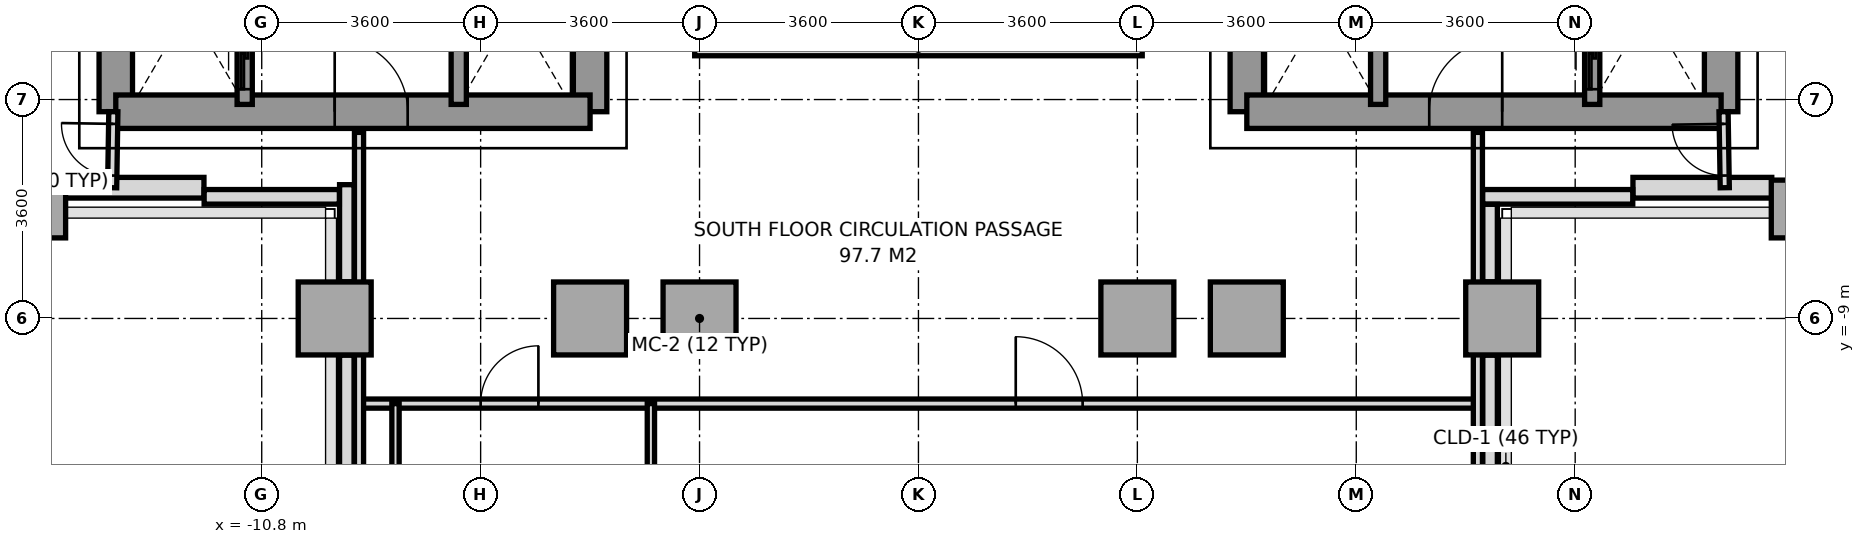
"""IFC4 building model, lengths in metres.
Left out: names, types, materials, properties, quantities, classifications, styles, units other than length and angle.
Written with IfcOpenShell. Run it as: python <this file> out.ifc"""

import sys

from ifc_helpers import new_model, si_unit, direction, frame, frame_2d, origin, origin_2d, place, context, subcontext, project, spatial, rectangle, extrude, source, transform, mapped, element, fill, save


model = new_model("IFC4")
c1 = context("Model", 3, precision=1e-05, world=origin(), true_north=direction((0.0, 1.0)))
c2 = subcontext(c1, "Body", "Model", "MODEL_VIEW")
j1 = project(units=[si_unit("LENGTHUNIT", "METRE"), si_unit("PLANEANGLEUNIT", "RADIAN")], contexts=[c1])
p1 = place(None, origin())
s1 = spatial("IfcSite", under=j1, at=p1, CompositionType="ELEMENT")
p2 = place(p1, origin())
s2 = spatial("IfcBuilding", under=s1, at=p2, CompositionType="ELEMENT")
p3 = place(p2, frame((0.0, 0.0, 44.2)))
s3 = spatial("IfcBuildingStorey", under=s2, at=p3, CompositionType="ELEMENT", Elevation=44.2)
m1 = source(origin(), c2, "Body", "SweptSolid", [
    extrude(rectangle(XDim=0.75, YDim=0.95, at=origin_2d()), origin(), (0.0, 0.0, 1.0), 3.2),
])
p4 = place(p3, frame((-14.4, -7.2, 0.0), z_axis=(0.0, 0.0, 1.0), x_axis=(1.0, 0.0, 0.0)))
e1 = element("IfcColumn", 1, at=p4, inside=s3, PredefinedType="COLUMN", context=c2, shape_type="MappedRepresentation", body=[
    mapped(m1, transform((0.0, 0.0, 0.0), x_axis=(1.0, 0.0, 0.0), y_axis=(0.0, 1.0, 0.0), z_axis=(0.0, 0.0, 1.0), scale=1.0)),
])
m2 = source(origin(), c2, "Body", "SweptSolid", [
    extrude(rectangle(XDim=1.2, YDim=1.2, at=origin_2d()), origin(), (0.0, 0.0, 1.0), 3.2),
])
for number, where, z_axis, x_axis in (
    (2, (-9.6, -9.0, 0.0), (0.0, 0.0, 1.0), (1.0, 0.0, 0.0)),
    (3, (-5.4, -9.0, 0.0), (0.0, 0.0, 1.0), (1.0, 0.0, 0.0)),
    (4, (-3.6, -9.0, 0.0), (0.0, 0.0, 1.0), (1.0, 0.0, 0.0)),
    (5, (3.6, -9.0, 0.0), (0.0, 0.0, 1.0), (1.0, 0.0, 0.0)),
    (6, (5.4, -9.0, 0.0), (0.0, 0.0, 1.0), (1.0, 0.0, 0.0)),
    (7, (9.6, -9.0, 0.0), (0.0, 0.0, 1.0), (1.0, 0.0, 0.0)),
):
    element("IfcColumn", number, at=place(p3, frame(where, z_axis=z_axis, x_axis=x_axis)), inside=s3, PredefinedType="COLUMN", context=c2, shape_type="MappedRepresentation", body=[
        mapped(m2, transform((0.0, 0.0, 0.0), x_axis=(1.0, 0.0, 0.0), y_axis=(0.0, 1.0, 0.0), z_axis=(0.0, 0.0, 1.0), scale=1.0)),
    ])
p5 = place(p3, frame((14.4, -7.2, 0.0), z_axis=(0.0, 0.0, 1.0), x_axis=(1.0, 0.0, 0.0)))
e8 = element("IfcColumn", 8, at=p5, inside=s3, PredefinedType="COLUMN", context=c2, shape_type="MappedRepresentation", body=[
    mapped(m1, transform((0.0, 0.0, 0.0), x_axis=(1.0, 0.0, 0.0), y_axis=(0.0, 1.0, 0.0), z_axis=(0.0, 0.0, 1.0), scale=1.0)),
])
for number, where, z_axis, x_axis in (
    (9, (-14.033, -6.85, 0.0), (0.0, 0.0, 1.0), (1.0, 0.0, 0.0)),
    (10, (11.75, -6.85, 0.0), (0.0, 0.0, 1.0), (1.0, 0.0, 0.0)),
):
    element("IfcWall", number, at=place(p3, frame(where, z_axis=z_axis, x_axis=x_axis)), inside=s3, PredefinedType="SOLIDWALL", context=c2, shape_type="SweptSolid", body=[
        extrude(rectangle(XDim=2.283, YDim=0.34, at=frame_2d((1.142, 0.0))), origin(), (0.0, 0.0, 1.0), 3.2),
    ])
p6 = place(p3, frame((11.747, -7.0, 0.0), z_axis=(0.0, 0.0, 1.0), x_axis=(-1.0, 0.0, 0.0)))
e11 = element("IfcWall", 11, at=p6, inside=s3, PredefinedType="PARAPET", context=c2, shape_type="SweptSolid", body=[
    extrude(rectangle(XDim=2.469, YDim=0.24, at=frame_2d((1.234, 0.0))), origin(), (0.0, 0.0, 1.0), 1.15),
])
p7 = place(p3, frame((9.4, -7.123, 0.0), z_axis=(0.0, 0.0, 1.0), x_axis=(0.0, -1.0, 0.0)))
e12 = element("IfcWall", 12, at=p7, inside=s3, PredefinedType="PARAPET", context=c2, shape_type="SweptSolid", body=[
    extrude(rectangle(XDim=1.274, YDim=0.24, at=frame_2d((0.637, 0.0))), origin(), (0.0, 0.0, 1.0), 1.15),
])
p8 = place(p3, frame((9.4, -9.603, 0.0), z_axis=(0.0, 0.0, 1.0), x_axis=(0.0, -1.0, 0.0)))
e13 = element("IfcWall", 13, at=p8, inside=s3, PredefinedType="PARAPET", context=c2, shape_type="SweptSolid", body=[
    extrude(rectangle(XDim=6.0, YDim=0.24, at=frame_2d((3.0, 0.0))), origin(), (0.0, 0.0, 1.0), 1.15),
])
p9 = place(p3, frame((-9.4, -15.358, 0.0), z_axis=(0.0, 0.0, 1.0), x_axis=(0.0, 1.0, 0.0)))
e14 = element("IfcWall", 14, at=p9, inside=s3, PredefinedType="PARAPET", context=c2, shape_type="SweptSolid", body=[
    extrude(rectangle(XDim=5.755, YDim=0.24, at=frame_2d((2.877, 0.0))), origin(), (0.0, 0.0, 1.0), 1.15),
])
p10 = place(p3, frame((-9.4, -8.397, 0.0), z_axis=(0.0, 0.0, 1.0), x_axis=(0.0, 1.0, 0.0)))
e15 = element("IfcWall", 15, at=p10, inside=s3, PredefinedType="PARAPET", context=c2, shape_type="SweptSolid", body=[
    extrude(rectangle(XDim=1.597, YDim=0.24, at=frame_2d((0.798, 0.0))), origin(), (0.0, 0.0, 1.0), 1.15),
])
p11 = place(p3, frame((-9.523, -7.0, 0.0), z_axis=(0.0, 0.0, 1.0), x_axis=(-1.0, 0.0, 0.0)))
e16 = element("IfcWall", 16, at=p11, inside=s3, PredefinedType="PARAPET", context=c2, shape_type="SweptSolid", body=[
    extrude(rectangle(XDim=2.224, YDim=0.24, at=frame_2d((1.112, 0.0))), origin(), (0.0, 0.0, 1.0), 1.15),
])
p12 = place(p3, frame((-13.2, -5.6, 0.0), z_axis=(0.0, 0.0, 1.0), x_axis=(0.0, 1.0, 0.0)))
e17 = element("IfcWall", 17, at=p12, inside=s3, PredefinedType="SHEAR", context=c2, shape_type="SweptSolid", body=[
    extrude(rectangle(XDim=11.2, YDim=0.55, at=frame_2d((5.6, 0.0))), origin(), (0.0, 0.0, 1.0), 3.2),
])
p13 = place(p3, frame((-5.4, -5.6, 0.0), z_axis=(0.0, 0.0, 1.0), x_axis=(0.0, 1.0, 0.0)))
e18 = element("IfcWall", 18, at=p13, inside=s3, PredefinedType="SHEAR", context=c2, shape_type="SweptSolid", body=[
    extrude(rectangle(XDim=12.5, YDim=0.55, at=frame_2d((6.25, 0.0))), origin(), (0.0, 0.0, 1.0), 3.2),
])
p14 = place(p13, frame((4.55, 0.0, 0.0)))
e19 = element("IfcOpeningElement", 19, at=p14, cuts=e18, PredefinedType="OPENING", context=c2, shape_type="SweptSolid", body=[
    extrude(rectangle(XDim=1.2, YDim=2.2, at=frame_2d((0.6, 1.1))), frame((0.0, 0.285, 0.0), z_axis=(0.0, -1.0, 0.0), x_axis=(1.0, 0.0, 0.0)), (0.0, 0.0, 1.0), 0.57),
])
p15 = place(p13, frame((6.86, 0.0, 0.0)))
e20 = element("IfcOpeningElement", 20, at=p15, cuts=e18, PredefinedType="OPENING", context=c2, shape_type="SweptSolid", body=[
    extrude(rectangle(XDim=0.8, YDim=2.1, at=frame_2d((0.4, 1.05))), frame((0.0, 0.285, 0.0), z_axis=(0.0, -1.0, 0.0), x_axis=(1.0, 0.0, 0.0)), (0.0, 0.0, 1.0), 0.57),
])
p16 = place(p13, frame((7.88, 0.0, 0.0)))
e21 = element("IfcOpeningElement", 21, at=p16, cuts=e18, PredefinedType="OPENING", context=c2, shape_type="SweptSolid", body=[
    extrude(rectangle(XDim=0.8, YDim=2.1, at=frame_2d((0.4, 1.05))), frame((0.0, 0.285, 0.0), z_axis=(0.0, -1.0, 0.0), x_axis=(1.0, 0.0, 0.0)), (0.0, 0.0, 1.0), 0.57),
])
p17 = place(p3, frame((-13.2, -5.6, 0.0), z_axis=(0.0, 0.0, 1.0), x_axis=(1.0, 0.0, 0.0)))
e22 = element("IfcWall", 22, at=p17, inside=s3, PredefinedType="SHEAR", context=c2, shape_type="SweptSolid", body=[
    extrude(rectangle(XDim=7.8, YDim=0.55, at=frame_2d((3.9, 0.0))), origin(), (0.0, 0.0, 1.0), 3.2),
])
p18 = place(p17, frame((3.6, 0.0, 0.0)))
e23 = element("IfcOpeningElement", 23, at=p18, cuts=e22, PredefinedType="OPENING", context=c2, shape_type="SweptSolid", body=[
    extrude(rectangle(XDim=1.2, YDim=2.2, at=frame_2d((0.6, 1.1))), frame((0.0, 0.285, 0.0), z_axis=(0.0, -1.0, 0.0), x_axis=(1.0, 0.0, 0.0)), (0.0, 0.0, 1.0), 0.57),
])
p19 = place(p3, frame((13.2, -5.6, 0.0), z_axis=(0.0, 0.0, 1.0), x_axis=(0.0, 1.0, 0.0)))
e24 = element("IfcWall", 24, at=p19, inside=s3, PredefinedType="SHEAR", context=c2, shape_type="SweptSolid", body=[
    extrude(rectangle(XDim=11.2, YDim=0.55, at=frame_2d((5.6, 0.0))), origin(), (0.0, 0.0, 1.0), 3.2),
])
p20 = place(p3, frame((5.4, -5.6, 0.0), z_axis=(0.0, 0.0, 1.0), x_axis=(0.0, 1.0, 0.0)))
e25 = element("IfcWall", 25, at=p20, inside=s3, PredefinedType="SHEAR", context=c2, shape_type="SweptSolid", body=[
    extrude(rectangle(XDim=12.5, YDim=0.55, at=frame_2d((6.25, 0.0))), origin(), (0.0, 0.0, 1.0), 3.2),
])
p21 = place(p20, frame((4.55, 0.0, 0.0)))
e26 = element("IfcOpeningElement", 26, at=p21, cuts=e25, PredefinedType="OPENING", context=c2, shape_type="SweptSolid", body=[
    extrude(rectangle(XDim=1.2, YDim=2.2, at=frame_2d((0.6, 1.1))), frame((0.0, 0.285, 0.0), z_axis=(0.0, -1.0, 0.0), x_axis=(1.0, 0.0, 0.0)), (0.0, 0.0, 1.0), 0.57),
])
p22 = place(p3, frame((5.4, -5.6, 0.0), z_axis=(0.0, 0.0, 1.0), x_axis=(1.0, 0.0, 0.0)))
e27 = element("IfcWall", 27, at=p22, inside=s3, PredefinedType="SHEAR", context=c2, shape_type="SweptSolid", body=[
    extrude(rectangle(XDim=7.8, YDim=0.55, at=frame_2d((3.9, 0.0))), origin(), (0.0, 0.0, 1.0), 3.2),
])
p23 = place(p22, frame((3.0, 0.0, 0.0)))
e28 = element("IfcOpeningElement", 28, at=p23, cuts=e27, PredefinedType="OPENING", context=c2, shape_type="SweptSolid", body=[
    extrude(rectangle(XDim=1.2, YDim=2.2, at=frame_2d((0.6, 1.1))), frame((0.0, 0.285, 0.0), z_axis=(0.0, -1.0, 0.0), x_axis=(1.0, 0.0, 0.0)), (0.0, 0.0, 1.0), 0.57),
])
p24 = place(p3, frame((-11.08, -5.48, 0.0), z_axis=(0.0, 0.0, 1.0), x_axis=(0.0, 1.0, 0.0)))
e29 = element("IfcWall", 29, at=p24, inside=s3, PredefinedType="SOLIDWALL", context=c2, shape_type="SweptSolid", body=[
    extrude(rectangle(XDim=1.6, YDim=0.25, at=frame_2d((0.8, 0.0))), origin(), (0.0, 0.0, 1.0), 3.2),
])
p25 = place(p24, frame((0.25, 0.0, 0.0)))
e30 = element("IfcOpeningElement", 30, at=p25, cuts=e29, PredefinedType="OPENING", context=c2, shape_type="SweptSolid", body=[
    extrude(rectangle(XDim=1.1, YDim=2.2, at=frame_2d((0.55, 1.1))), frame((0.0, 0.135, 0.0), z_axis=(0.0, -1.0, 0.0), x_axis=(1.0, 0.0, 0.0)), (0.0, 0.0, 1.0), 0.27),
])
p26 = place(p3, frame((11.08, -5.48, 0.0), z_axis=(0.0, 0.0, 1.0), x_axis=(0.0, 1.0, 0.0)))
e31 = element("IfcWall", 31, at=p26, inside=s3, PredefinedType="SOLIDWALL", context=c2, shape_type="SweptSolid", body=[
    extrude(rectangle(XDim=1.6, YDim=0.25, at=frame_2d((0.8, 0.0))), origin(), (0.0, 0.0, 1.0), 3.2),
])
p27 = place(p26, frame((0.25, 0.0, 0.0)))
e32 = element("IfcOpeningElement", 32, at=p27, cuts=e31, PredefinedType="OPENING", context=c2, shape_type="SweptSolid", body=[
    extrude(rectangle(XDim=1.1, YDim=2.2, at=frame_2d((0.55, 1.1))), frame((0.0, 0.135, 0.0), z_axis=(0.0, -1.0, 0.0), x_axis=(1.0, 0.0, 0.0)), (0.0, 0.0, 1.0), 0.27),
])
for number, where, z_axis, x_axis in (
    (33, (-7.56, -5.48, 0.0), (0.0, 0.0, 1.0), (0.0, 1.0, 0.0)),
    (34, (7.56, -5.48, 0.0), (0.0, 0.0, 1.0), (0.0, 1.0, 0.0)),
):
    element("IfcWall", number, at=place(p3, frame(where, z_axis=z_axis, x_axis=x_axis)), inside=s3, PredefinedType="SOLIDWALL", context=c2, shape_type="SweptSolid", body=[
        extrude(rectangle(XDim=1.6, YDim=0.25, at=frame_2d((0.8, 0.0))), origin(), (0.0, 0.0, 1.0), 3.2),
    ])
p28 = place(p3, frame((-9.2, -10.4, 0.0), z_axis=(0.0, 0.0, 1.0), x_axis=(1.0, 0.0, 0.0)))
e35 = element("IfcWall", 35, at=p28, inside=s3, PredefinedType="PARTITIONING", context=c2, shape_type="SweptSolid", body=[
    extrude(rectangle(XDim=18.4, YDim=0.15, at=frame_2d((9.2, 0.0))), origin(), (0.0, 0.0, 1.0), 3.2),
])
p29 = place(p28, frame((2.0, 0.0, 0.0)))
e36 = element("IfcOpeningElement", 36, at=p29, cuts=e35, PredefinedType="OPENING", context=c2, shape_type="SweptSolid", body=[
    extrude(rectangle(XDim=0.95, YDim=2.15, at=frame_2d((0.475, 1.075))), frame((0.0, 0.085, 0.0), z_axis=(0.0, -1.0, 0.0), x_axis=(1.0, 0.0, 0.0)), (0.0, 0.0, 1.0), 0.17),
])
p30 = place(p28, frame((10.8, 0.0, 0.0)))
e37 = element("IfcOpeningElement", 37, at=p30, cuts=e35, PredefinedType="OPENING", context=c2, shape_type="SweptSolid", body=[
    extrude(rectangle(XDim=1.1, YDim=2.2, at=frame_2d((0.55, 1.1))), frame((0.0, 0.085, 0.0), z_axis=(0.0, -1.0, 0.0), x_axis=(1.0, 0.0, 0.0)), (0.0, 0.0, 1.0), 0.17),
])
for number, where, z_axis, x_axis in (
    (38, (-9.2, -15.68, 0.0), (0.0, 0.0, 1.0), (0.0, 1.0, 0.0)),
    (39, (9.2, -15.68, 0.0), (0.0, 0.0, 1.0), (0.0, 1.0, 0.0)),
):
    element("IfcWall", number, at=place(p3, frame(where, z_axis=z_axis, x_axis=x_axis)), inside=s3, PredefinedType="PARTITIONING", context=c2, shape_type="SweptSolid", body=[
        extrude(rectangle(XDim=9.74, YDim=0.15, at=frame_2d((4.87, 0.0))), origin(), (0.0, 0.0, 1.0), 2.65),
    ])
for number, where, z_axis, x_axis in (
    (40, (-8.6, -14.0, 0.0), (0.0, 0.0, 1.0), (0.0, 1.0, 0.0)),
    (41, (-4.4, -14.0, 0.0), (0.0, 0.0, 1.0), (0.0, 1.0, 0.0)),
):
    element("IfcWall", number, at=place(p3, frame(where, z_axis=z_axis, x_axis=x_axis)), inside=s3, PredefinedType="PARTITIONING", context=c2, shape_type="SweptSolid", body=[
        extrude(rectangle(XDim=3.6, YDim=0.12, at=frame_2d((1.8, 0.0))), origin(), (0.0, 0.0, 1.0), 3.2),
    ])
p31 = place(p3, frame((-13.26, -6.85, 0.0), z_axis=(0.0, 0.0, 1.0), x_axis=(0.016013571389, 0.999871774545, 0.0)))
e42 = element("IfcWall", 42, at=p31, inside=s3, PredefinedType="PARTITIONING", context=c2, shape_type="SweptSolid", body=[
    extrude(rectangle(XDim=1.25, YDim=0.15, at=frame_2d((0.625, 0.0))), origin(), (0.0, 0.0, 1.0), 3.2),
])
p32 = place(p31, frame((0.2, 0.0, 0.0)))
e43 = element("IfcOpeningElement", 43, at=p32, cuts=e42, PredefinedType="OPENING", context=c2, shape_type="SweptSolid", body=[
    extrude(rectangle(XDim=0.85, YDim=2.1, at=frame_2d((0.425, 1.05))), frame((0.0, 0.085, 0.0), z_axis=(0.0, -1.0, 0.0), x_axis=(1.0, 0.0, 0.0)), (0.0, 0.0, 1.0), 0.17),
])
p33 = place(p3, frame((13.26, -6.85, 0.0), z_axis=(0.0, 0.0, 1.0), x_axis=(-0.016013571389, 0.999871774545, 0.0)))
e44 = element("IfcWall", 44, at=p33, inside=s3, PredefinedType="PARTITIONING", context=c2, shape_type="SweptSolid", body=[
    extrude(rectangle(XDim=1.25, YDim=0.15, at=frame_2d((0.625, 0.0))), origin(), (0.0, 0.0, 1.0), 3.2),
])
p34 = place(p33, frame((0.2, 0.0, 0.0)))
e45 = element("IfcOpeningElement", 45, at=p34, cuts=e44, PredefinedType="OPENING", context=c2, shape_type="SweptSolid", body=[
    extrude(rectangle(XDim=0.85, YDim=2.1, at=frame_2d((0.425, 1.05))), frame((0.0, 0.085, 0.0), z_axis=(0.0, -1.0, 0.0), x_axis=(1.0, 0.0, 0.0)), (0.0, 0.0, 1.0), 0.17),
])
p35 = place(p3, frame((-3.68, -4.56, 0.0), z_axis=(0.0, 0.0, 1.0), x_axis=(1.0, 0.0, 0.0)))
e46 = element("IfcWall", 46, at=p35, inside=s3, PredefinedType="PARAPET", context=c2, shape_type="SweptSolid", body=[
    extrude(rectangle(XDim=7.36, YDim=0.24, at=frame_2d((3.68, 0.0))), origin(), (0.0, 0.0, 1.0), 1.15),
])
m3 = source(origin(), c2, "Body", "SweptSolid", [
    extrude(rectangle(XDim=1.2, YDim=2.2, at=frame_2d((0.6, 1.1))), frame((0.0, 0.025, 0.0), z_axis=(0.0, -1.0, 0.0), x_axis=(1.0, 0.0, 0.0)), (0.0, 0.0, 1.0), 0.05),
])
p36 = place(p18, origin())
e47 = element("IfcDoor", 47, at=p36, inside=s3, OperationType="SINGLE_SWING_LEFT", PredefinedType="DOOR", context=c2, shape_type="MappedRepresentation", body=[
    mapped(m3, transform((0.0, 0.0, 0.0), x_axis=(1.0, 0.0, 0.0), y_axis=(0.0, 1.0, 0.0), z_axis=(0.0, 0.0, 1.0), scale=1.0)),
])
fill(e23, e47)
p37 = place(p23, origin())
e48 = element("IfcDoor", 48, at=p37, inside=s3, OperationType="SINGLE_SWING_RIGHT", PredefinedType="DOOR", context=c2, shape_type="MappedRepresentation", body=[
    mapped(m3, transform((0.0, 0.0, 0.0), x_axis=(1.0, 0.0, 0.0), y_axis=(0.0, 1.0, 0.0), z_axis=(0.0, 0.0, 1.0), scale=1.0)),
])
fill(e28, e48)
m4 = source(origin(), c2, "Body", "SweptSolid", [
    extrude(rectangle(XDim=1.1, YDim=2.2, at=frame_2d((0.55, 1.1))), frame((0.0, 0.025, 0.0), z_axis=(0.0, -1.0, 0.0), x_axis=(1.0, 0.0, 0.0)), (0.0, 0.0, 1.0), 0.05),
])
p38 = place(p25, origin())
e49 = element("IfcDoor", 49, at=p38, inside=s3, OperationType="SLIDING_TO_LEFT", PredefinedType="DOOR", context=c2, shape_type="MappedRepresentation", body=[
    mapped(m4, transform((0.0, 0.0, 0.0), x_axis=(1.0, 0.0, 0.0), y_axis=(0.0, 1.0, 0.0), z_axis=(0.0, 0.0, 1.0), scale=1.0)),
])
fill(e30, e49)
p39 = place(p27, origin())
e50 = element("IfcDoor", 50, at=p39, inside=s3, OperationType="SLIDING_TO_LEFT", PredefinedType="DOOR", context=c2, shape_type="MappedRepresentation", body=[
    mapped(m4, transform((0.0, 0.0, 0.0), x_axis=(1.0, 0.0, 0.0), y_axis=(0.0, 1.0, 0.0), z_axis=(0.0, 0.0, 1.0), scale=1.0)),
])
fill(e32, e50)
m5 = source(origin(), c2, "Body", "SweptSolid", [
    extrude(rectangle(XDim=0.95, YDim=2.15, at=frame_2d((0.475, 1.075))), frame((0.0, 0.025, 0.0), z_axis=(0.0, -1.0, 0.0), x_axis=(1.0, 0.0, 0.0)), (0.0, 0.0, 1.0), 0.05),
])
p40 = place(p29, origin())
e51 = element("IfcDoor", 51, at=p40, inside=s3, OperationType="SINGLE_SWING_RIGHT", PredefinedType="DOOR", context=c2, shape_type="MappedRepresentation", body=[
    mapped(m5, transform((0.0, 0.0, 0.0), x_axis=(1.0, 0.0, 0.0), y_axis=(0.0, 1.0, 0.0), z_axis=(0.0, 0.0, 1.0), scale=1.0)),
])
fill(e36, e51)
p41 = place(p30, origin())
e52 = element("IfcDoor", 52, at=p41, inside=s3, OperationType="SINGLE_SWING_LEFT", PredefinedType="DOOR", context=c2, shape_type="MappedRepresentation", body=[
    mapped(m4, transform((0.0, 0.0, 0.0), x_axis=(1.0, 0.0, 0.0), y_axis=(0.0, 1.0, 0.0), z_axis=(0.0, 0.0, 1.0), scale=1.0)),
])
fill(e37, e52)
m6 = source(origin(), c2, "Body", "SweptSolid", [
    extrude(rectangle(XDim=0.85, YDim=2.1, at=frame_2d((0.425, 1.05))), frame((0.0, 0.025, 0.0), z_axis=(0.0, -1.0, 0.0), x_axis=(1.0, 0.0, 0.0)), (0.0, 0.0, 1.0), 0.05),
])
p42 = place(p32, origin())
e53 = element("IfcDoor", 53, at=p42, inside=s3, OperationType="SINGLE_SWING_RIGHT", PredefinedType="DOOR", context=c2, shape_type="MappedRepresentation", body=[
    mapped(m6, transform((0.0, 0.0, 0.0), x_axis=(1.0, 0.0, 0.0), y_axis=(0.0, 1.0, 0.0), z_axis=(0.0, 0.0, 1.0), scale=1.0)),
])
fill(e43, e53)
p43 = place(p34, origin())
e54 = element("IfcDoor", 54, at=p43, inside=s3, OperationType="SINGLE_SWING_RIGHT", PredefinedType="DOOR", context=c2, shape_type="MappedRepresentation", body=[
    mapped(m6, transform((0.0, 0.0, 0.0), x_axis=(1.0, 0.0, 0.0), y_axis=(0.0, 1.0, 0.0), z_axis=(0.0, 0.0, 1.0), scale=1.0)),
])
fill(e45, e54)
save(model, sys.argv[1])
